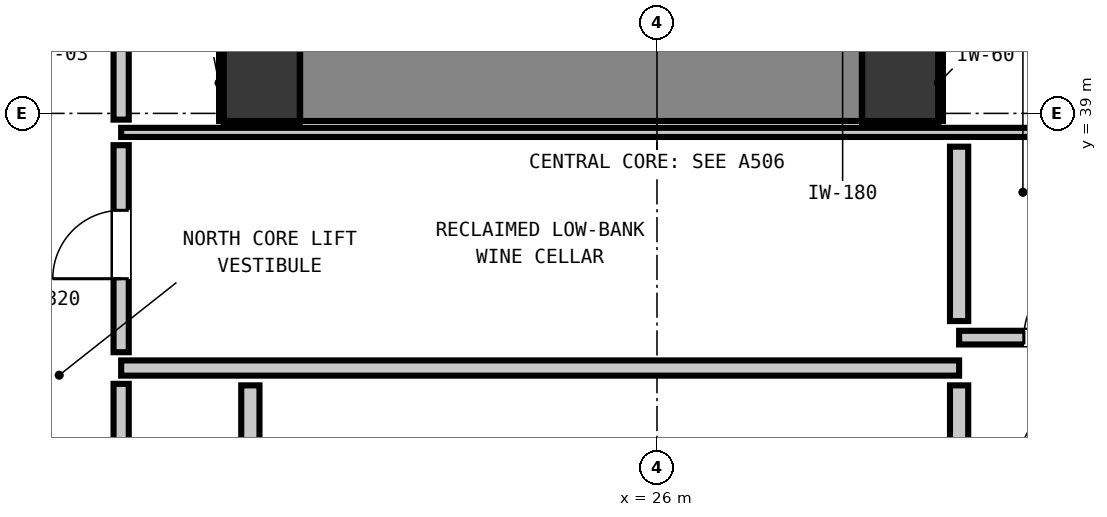
"""IFC4 building model, lengths in metres.
Left out: names, types, materials, properties, quantities, classifications, styles, units other than length and angle.
Written with IfcOpenShell. Run it as: python <this file> out.ifc"""

import sys

from ifc_helpers import new_model, si_unit, direction, frame, frame_2d, origin, origin_2d, place, context, subcontext, project, spatial, rectangle, extrude, element, fill, save


model = new_model("IFC4")
c1 = context("Model", 3, precision=1e-05, world=origin(), true_north=direction((0.0, 1.0)))
c2 = subcontext(c1, "Body", "Model", "MODEL_VIEW")
j1 = project(units=[si_unit("LENGTHUNIT", "METRE"), si_unit("PLANEANGLEUNIT", "RADIAN")], contexts=[c1])
p1 = place(None, origin())
s1 = spatial("IfcSite", under=j1, at=p1, CompositionType="ELEMENT")
p2 = place(p1, origin())
s2 = spatial("IfcBuilding", under=s1, at=p2, CompositionType="ELEMENT")
p3 = place(p2, frame((0.0, 0.0, 106.08)))
s3 = spatial("IfcBuildingStorey", under=s2, at=p3, CompositionType="ELEMENT", Elevation=106.08)
for number, where, z_axis, x_axis in (
    (1, (20.8, 39.4, 0.0), (0.0, 0.0, 1.0), (1.0, 0.0, 0.0)),
    (2, (29.2, 39.4, 0.0), (0.0, 0.0, 1.0), (1.0, 0.0, 0.0)),
):
    element("IfcColumn", number, at=place(p3, frame(where, z_axis=z_axis, x_axis=x_axis)), inside=s3, PredefinedType="COLUMN", context=c2, shape_type="SweptSolid", body=[
        extrude(rectangle(XDim=1.0, YDim=1.0, at=origin_2d()), origin(), (0.0, 0.0, 1.0), 3.32),
    ])
p4 = place(p3, frame((21.305, 39.4, 0.0), z_axis=(0.0, 0.0, 1.0), x_axis=(1.0, 0.0, 0.0)))
e3 = element("IfcWall", 3, at=p4, inside=s3, PredefinedType="SHEAR", context=c2, shape_type="SweptSolid", body=[
    extrude(rectangle(XDim=7.39, YDim=1.0, at=frame_2d((3.695, 0.0))), origin(), (0.0, 0.0, 1.0), 3.32),
])
p5 = place(p3, frame((18.95, 35.65, 0.0), z_axis=(0.0, 0.0, 1.0), x_axis=(1.0, 0.0, 0.0)))
e4 = element("IfcWall", 4, at=p5, inside=s3, PredefinedType="PARTITIONING", context=c2, shape_type="SweptSolid", body=[
    extrude(rectangle(XDim=11.025, YDim=0.2, at=frame_2d((5.513, 0.0))), origin(), (0.0, 0.0, 1.0), 3.08),
])
p6 = place(p3, frame((29.975, 36.05, 0.0), z_axis=(0.0, 0.0, 1.0), x_axis=(1.0, 0.0, 0.0)))
e5 = element("IfcWall", 5, at=p6, inside=s3, PredefinedType="PARTITIONING", context=c2, shape_type="SweptSolid", body=[
    extrude(rectangle(XDim=2.505, YDim=0.18, at=frame_2d((1.252, 0.0))), origin(), (0.0, 0.0, 1.0), 3.08),
])
p7 = place(p6, frame((0.852, 0.0, 0.0)))
e6 = element("IfcOpeningElement", 6, at=p7, cuts=e5, PredefinedType="OPENING", context=c2, shape_type="SweptSolid", body=[
    extrude(rectangle(XDim=0.9, YDim=2.1, at=frame_2d((0.45, 1.05))), frame((0.0, 0.1, 0.0), z_axis=(0.0, -1.0, 0.0), x_axis=(1.0, 0.0, 0.0)), (0.0, 0.0, 1.0), 0.2),
])
p8 = place(p3, frame((18.95, 38.75, 0.0), z_axis=(0.0, 0.0, 1.0), x_axis=(1.0, 0.0, 0.0)))
e7 = element("IfcWall", 7, at=p8, inside=s3, PredefinedType="PARTITIONING", context=c2, shape_type="SweptSolid", body=[
    extrude(rectangle(XDim=13.56, YDim=0.12, at=frame_2d((6.78, 0.0))), origin(), (0.0, 0.0, 1.0), 3.08),
])
p9 = place(p3, frame((20.65, 33.148, 0.0), z_axis=(0.0, 0.0, 1.0), x_axis=(0.0, 1.0, 0.0)))
e8 = element("IfcWall", 8, at=p9, inside=s3, PredefinedType="PARTITIONING", context=c2, shape_type="SweptSolid", body=[
    extrude(rectangle(XDim=2.274, YDim=0.24, at=frame_2d((1.137, 0.0))), origin(), (0.0, 0.0, 1.0), 2.315),
])
p10 = place(p3, frame((29.975, 34.498, 0.0), z_axis=(0.0, 0.0, 1.0), x_axis=(0.0, 1.0, 0.0)))
e9 = element("IfcWall", 9, at=p10, inside=s3, PredefinedType="PARTITIONING", context=c2, shape_type="SweptSolid", body=[
    extrude(rectangle(XDim=0.924, YDim=0.24, at=frame_2d((0.462, 0.0))), origin(), (0.0, 0.0, 1.0), 3.08),
])
p11 = place(p3, frame((29.975, 36.268, 0.0), z_axis=(0.0, 0.0, 1.0), x_axis=(0.0, 1.0, 0.0)))
e10 = element("IfcWall", 10, at=p11, inside=s3, PredefinedType="PARTITIONING", context=c2, shape_type="SweptSolid", body=[
    extrude(rectangle(XDim=2.294, YDim=0.24, at=frame_2d((1.147, 0.0))), origin(), (0.0, 0.0, 1.0), 3.08),
])
p12 = place(p3, frame((18.95, 33.128, 0.0), z_axis=(0.0, 0.0, 1.0), x_axis=(0.0, 1.0, 0.0)))
e11 = element("IfcWall", 11, at=p12, inside=s3, PredefinedType="PARTITIONING", context=c2, shape_type="SweptSolid", body=[
    extrude(rectangle(XDim=2.314, YDim=0.2, at=frame_2d((1.157, 0.0))), origin(), (0.0, 0.0, 1.0), 3.08),
])
p13 = place(p3, frame((18.95, 35.858, 0.0), z_axis=(0.0, 0.0, 1.0), x_axis=(0.0, 1.0, 0.0)))
e12 = element("IfcWall", 12, at=p13, inside=s3, PredefinedType="PARTITIONING", context=c2, shape_type="SweptSolid", body=[
    extrude(rectangle(XDim=2.724, YDim=0.2, at=frame_2d((1.362, 0.0))), origin(), (0.0, 0.0, 1.0), 3.08),
])
p14 = place(p13, frame((0.967, 0.0, 0.0)))
e13 = element("IfcOpeningElement", 13, at=p14, cuts=e12, PredefinedType="OPENING", context=c2, shape_type="SweptSolid", body=[
    extrude(rectangle(XDim=0.9, YDim=2.1, at=frame_2d((0.45, 1.05))), frame((0.0, 0.11, 0.0), z_axis=(0.0, -1.0, 0.0), x_axis=(1.0, 0.0, 0.0)), (0.0, 0.0, 1.0), 0.22),
])
p15 = place(p3, frame((18.95, 38.918, 0.0), z_axis=(0.0, 0.0, 1.0), x_axis=(0.0, 1.0, 0.0)))
e14 = element("IfcWall", 14, at=p15, inside=s3, PredefinedType="PARTITIONING", context=c2, shape_type="SweptSolid", body=[
    extrude(rectangle(XDim=1.134, YDim=0.2, at=frame_2d((0.567, 0.0))), origin(), (0.0, 0.0, 1.0), 3.08),
])
for number, where, z_axis, x_axis in (
    (15, (20.3, 38.868, 0.0), (0.0, 0.0, 1.0), (1.0, 0.0, 0.0)),
    (16, (20.268, 38.9, 0.0), (0.0, 0.0, 1.0), (0.0, 1.0, 0.0)),
    (17, (28.7, 38.868, 0.0), (0.0, 0.0, 1.0), (1.0, 0.0, 0.0)),
    (18, (29.732, 38.9, 0.0), (0.0, 0.0, 1.0), (0.0, 1.0, 0.0)),
):
    element("IfcWall", number, at=place(p3, frame(where, z_axis=z_axis, x_axis=x_axis)), inside=s3, PredefinedType="PARTITIONING", context=c2, shape_type="SweptSolid", body=[
        extrude(rectangle(XDim=1.0, YDim=0.06, at=frame_2d((0.5, 0.0))), origin(), (0.0, 0.0, 1.0), 1.45),
    ])
p16 = place(p7, origin())
e19 = element("IfcDoor", 19, at=p16, inside=s3, OperationType="SINGLE_SWING_RIGHT", PredefinedType="DOOR", context=c2, shape_type="SweptSolid", body=[
    extrude(rectangle(XDim=0.9, YDim=2.1, at=frame_2d((0.45, 1.05))), frame((0.0, 0.025, 0.0), z_axis=(0.0, -1.0, 0.0), x_axis=(1.0, 0.0, 0.0)), (0.0, 0.0, 1.0), 0.05),
])
fill(e6, e19)
p17 = place(p14, origin())
e20 = element("IfcDoor", 20, at=p17, inside=s3, OperationType="SINGLE_SWING_LEFT", PredefinedType="DOOR", context=c2, shape_type="SweptSolid", body=[
    extrude(rectangle(XDim=0.9, YDim=2.1, at=frame_2d((0.45, 1.05))), frame((0.0, 0.025, 0.0), z_axis=(0.0, -1.0, 0.0), x_axis=(1.0, 0.0, 0.0)), (0.0, 0.0, 1.0), 0.05),
])
fill(e13, e20)
save(model, sys.argv[1])
